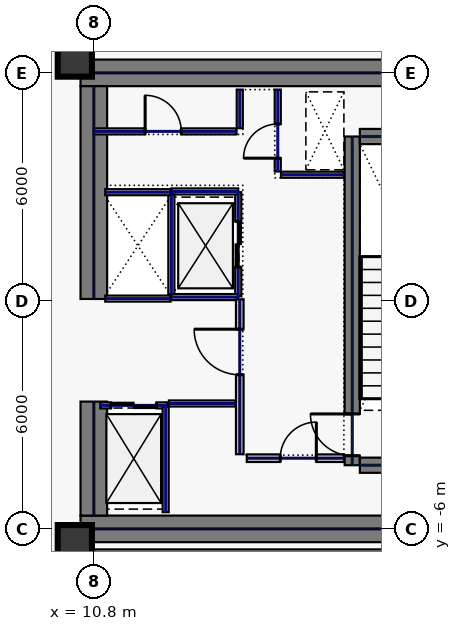
"""IFC4 building model, lengths in metres.
Left out: names, types, materials, properties, quantities, classifications, styles, units other than length and angle.
Written with IfcOpenShell. Run it as: python <this file> out.ifc"""

import sys

from ifc_helpers import new_model, si_unit, direction, frame, frame_2d, origin, origin_2d, place, context, subcontext, project, spatial, rectangle, hollow_rectangle, extrude, element, fill, save


model = new_model("IFC4")
c1 = context("Model", 3, precision=1e-05, world=origin(), true_north=direction((0.0, 1.0)))
c2 = subcontext(c1, "Body", "Model", "MODEL_VIEW")
j1 = project(units=[si_unit("LENGTHUNIT", "METRE"), si_unit("PLANEANGLEUNIT", "RADIAN")], contexts=[c1])
p1 = place(None, origin())
s1 = spatial("IfcSite", under=j1, at=p1, CompositionType="ELEMENT")
p2 = place(p1, origin())
s2 = spatial("IfcBuilding", under=s1, at=p2, CompositionType="ELEMENT")
p3 = place(p2, frame((0.0, 0.0, 196.2)))
s3 = spatial("IfcBuildingStorey", under=s2, at=p3, CompositionType="ELEMENT", Elevation=196.2)
for number, where, z_axis, x_axis in (
    (1, (10.45, 6.0, 0.0), (0.0, 0.0, 1.0), (1.0, 0.0, 0.0)),
    (2, (10.45, -6.0, 0.0), (0.0, 0.0, 1.0), (1.0, 0.0, 0.0)),
):
    element("IfcWall", number, at=place(p3, frame(where, z_axis=z_axis, x_axis=x_axis)), inside=s3, PredefinedType="SHEAR", context=c2, shape_type="SweptSolid", body=[
        extrude(rectangle(XDim=11.55, YDim=0.7, at=frame_2d((5.775, 0.0))), origin(), (0.0, 0.0, 1.0), 3.74),
    ])
p4 = place(p3, frame((10.8, -5.65, 0.0), z_axis=(0.0, 0.0, 1.0), x_axis=(0.0, 1.0, 0.0)))
e3 = element("IfcWall", 3, at=p4, inside=s3, PredefinedType="SHEAR", context=c2, shape_type="SweptSolid", body=[
    extrude(rectangle(XDim=3.0, YDim=0.7, at=frame_2d((1.5, 0.0))), origin(), (0.0, 0.0, 1.0), 3.74),
])
p5 = place(p3, frame((10.8, 0.05, 0.0), z_axis=(0.0, 0.0, 1.0), x_axis=(0.0, 1.0, 0.0)))
e4 = element("IfcWall", 4, at=p5, inside=s3, PredefinedType="SHEAR", context=c2, shape_type="SweptSolid", body=[
    extrude(rectangle(XDim=5.6, YDim=0.7, at=frame_2d((2.8, 0.0))), origin(), (0.0, 0.0, 1.0), 3.74),
])
p6 = place(p3, frame((17.6, -4.325, 0.0), z_axis=(0.0, 0.0, 1.0), x_axis=(0.0, 1.0, 0.0)))
e5 = element("IfcWall", 5, at=p6, inside=s3, PredefinedType="SHEAR", context=c2, shape_type="SweptSolid", body=[
    extrude(rectangle(XDim=8.65, YDim=0.4, at=frame_2d((4.325, 0.0))), origin(), (0.0, 0.0, 1.0), 3.74),
])
p7 = place(p6, frame((0.25, 0.0, 0.0)))
e6 = element("IfcOpeningElement", 6, at=p7, cuts=e5, PredefinedType="OPENING", context=c2, shape_type="SweptSolid", body=[
    extrude(rectangle(XDim=1.1, YDim=2.2, at=frame_2d((0.55, 1.1))), frame((0.0, 0.21, 0.0), z_axis=(0.0, -1.0, 0.0), x_axis=(1.0, 0.0, 0.0)), (0.0, 0.0, 1.0), 0.42),
])
for number, where, z_axis, x_axis in (
    (7, (17.8, -4.325, 0.0), (0.0, 0.0, 1.0), (1.0, 0.0, 0.0)),
    (8, (17.8, 4.325, 0.0), (0.0, 0.0, 1.0), (1.0, 0.0, 0.0)),
):
    element("IfcWall", number, at=place(p3, frame(where, z_axis=z_axis, x_axis=x_axis)), inside=s3, PredefinedType="SHEAR", context=c2, shape_type="SweptSolid", body=[
        extrude(rectangle(XDim=3.4, YDim=0.4, at=frame_2d((1.7, 0.0))), origin(), (0.0, 0.0, 1.0), 3.74),
    ])
for number, where, z_axis, x_axis in (
    (9, (10.3, -6.35, 0.0), (0.0, 0.0, 1.0), (1.0, 0.0, 0.0)),
    (10, (10.3, 6.35, 0.0), (0.0, 0.0, 1.0), (1.0, 0.0, 0.0)),
):
    element("IfcColumn", number, at=place(p3, frame(where, z_axis=z_axis, x_axis=x_axis)), inside=s3, PredefinedType="COLUMN", context=c2, shape_type="SweptSolid", body=[
        extrude(hollow_rectangle(XDim=0.9, YDim=0.9, WallThickness=0.04, at=origin_2d()), origin(), (0.0, 0.0, 1.0), 3.74),
    ])
p8 = place(p3, frame((14.6, 0.12, 0.0), z_axis=(0.0, 0.0, 1.0), x_axis=(0.0, 1.0, 0.0)))
e11 = element("IfcWall", 11, at=p8, inside=s3, PredefinedType="PARTITIONING", context=c2, shape_type="SweptSolid", body=[
    extrude(rectangle(XDim=2.74, YDim=0.16, at=frame_2d((1.37, 0.0))), origin(), (0.0, 0.0, 1.0), 3.74),
])
p9 = place(p8, frame((0.77, 0.0, 0.0)))
e12 = element("IfcOpeningElement", 12, at=p9, cuts=e11, PredefinedType="OPENING", context=c2, shape_type="SweptSolid", body=[
    extrude(rectangle(XDim=1.2, YDim=2.2, at=frame_2d((0.6, 1.1))), frame((0.0, 0.09, 0.0), z_axis=(0.0, -1.0, 0.0), x_axis=(1.0, 0.0, 0.0)), (0.0, 0.0, 1.0), 0.18),
])
for number, where, z_axis, x_axis in (
    (13, (12.84, 0.1, 0.0), (0.0, 0.0, 1.0), (1.0, 0.0, 0.0)),
    (14, (12.84, 2.88, 0.0), (0.0, 0.0, 1.0), (1.0, 0.0, 0.0)),
):
    element("IfcWall", number, at=place(p3, frame(where, z_axis=z_axis, x_axis=x_axis)), inside=s3, PredefinedType="PARTITIONING", context=c2, shape_type="SweptSolid", body=[
        extrude(rectangle(XDim=1.76, YDim=0.16, at=frame_2d((0.88, 0.0))), origin(), (0.0, 0.0, 1.0), 3.74),
    ])
p10 = place(p3, frame((12.84, 0.18, 0.0), z_axis=(0.0, 0.0, 1.0), x_axis=(0.0, 1.0, 0.0)))
e15 = element("IfcWall", 15, at=p10, inside=s3, PredefinedType="PARTITIONING", context=c2, shape_type="SweptSolid", body=[
    extrude(rectangle(XDim=2.62, YDim=0.16, at=frame_2d((1.31, 0.0))), origin(), (0.0, 0.0, 1.0), 3.74),
])
p11 = place(p3, frame((10.97, -2.75, 0.0), z_axis=(0.0, 0.0, 1.0), x_axis=(1.0, 0.0, 0.0)))
e16 = element("IfcWall", 16, at=p11, inside=s3, PredefinedType="PARTITIONING", context=c2, shape_type="SweptSolid", body=[
    extrude(rectangle(XDim=1.76, YDim=0.16, at=frame_2d((0.88, 0.0))), origin(), (0.0, 0.0, 1.0), 3.74),
])
p12 = place(p11, frame((0.28, 0.0, 0.0)))
e17 = element("IfcOpeningElement", 17, at=p12, cuts=e16, PredefinedType="OPENING", context=c2, shape_type="SweptSolid", body=[
    extrude(rectangle(XDim=1.2, YDim=2.2, at=frame_2d((0.6, 1.1))), frame((0.0, 0.09, 0.0), z_axis=(0.0, -1.0, 0.0), x_axis=(1.0, 0.0, 0.0)), (0.0, 0.0, 1.0), 0.18),
])
for number, where, z_axis, x_axis in (
    (18, (11.1, 0.06, 0.0), (0.0, 0.0, 1.0), (1.0, 0.0, 0.0)),
    (19, (11.1, 2.86, 0.0), (0.0, 0.0, 1.0), (1.0, 0.0, 0.0)),
):
    element("IfcWall", number, at=place(p3, frame(where, z_axis=z_axis, x_axis=x_axis)), inside=s3, PredefinedType="PARTITIONING", context=c2, shape_type="SweptSolid", body=[
        extrude(rectangle(XDim=1.72, YDim=0.16, at=frame_2d((0.86, 0.0))), origin(), (0.0, 0.0, 1.0), 3.74),
    ])
p13 = place(p3, frame((15.64, 3.405, 0.0), z_axis=(0.0, 0.0, 1.0), x_axis=(0.0, 1.0, 0.0)))
e20 = element("IfcWall", 20, at=p13, inside=s3, PredefinedType="PARTITIONING", context=c2, shape_type="SweptSolid", body=[
    extrude(rectangle(XDim=2.155, YDim=0.16, at=frame_2d((1.078, 0.0))), origin(), (0.0, 0.0, 1.0), 3.74),
])
p14 = place(p13, frame((0.35, 0.0, 0.0)))
e21 = element("IfcOpeningElement", 21, at=p14, cuts=e20, PredefinedType="OPENING", context=c2, shape_type="SweptSolid", body=[
    extrude(rectangle(XDim=0.9, YDim=2.2, at=frame_2d((0.45, 1.1))), frame((0.0, 0.09, 0.0), z_axis=(0.0, -1.0, 0.0), x_axis=(1.0, 0.0, 0.0)), (0.0, 0.0, 1.0), 0.18),
])
p15 = place(p3, frame((15.725, 3.32, 0.0), z_axis=(0.0, 0.0, 1.0), x_axis=(1.0, 0.0, 0.0)))
e22 = element("IfcWall", 22, at=p15, inside=s3, PredefinedType="PARTITIONING", context=c2, shape_type="SweptSolid", body=[
    extrude(rectangle(XDim=1.655, YDim=0.16, at=frame_2d((0.827, 0.0))), origin(), (0.0, 0.0, 1.0), 3.74),
])
p16 = place(p3, frame((14.825, -4.14, 0.0), z_axis=(0.0, 0.0, 1.0), x_axis=(1.0, 0.0, 0.0)))
e23 = element("IfcWall", 23, at=p16, inside=s3, PredefinedType="SOLIDWALL", context=c2, shape_type="SweptSolid", body=[
    extrude(rectangle(XDim=2.555, YDim=0.2, at=frame_2d((1.277, 0.0))), origin(), (0.0, 0.0, 1.0), 3.74),
])
p17 = place(p16, frame((0.88, 0.0, 0.0)))
e24 = element("IfcOpeningElement", 24, at=p17, cuts=e23, PredefinedType="OPENING", context=c2, shape_type="SweptSolid", body=[
    extrude(rectangle(XDim=0.95, YDim=2.2, at=frame_2d((0.475, 1.1))), frame((0.0, 0.11, 0.0), z_axis=(0.0, -1.0, 0.0), x_axis=(1.0, 0.0, 0.0)), (0.0, 0.0, 1.0), 0.22),
])
p18 = place(p3, frame((12.775, -2.7, 0.0), z_axis=(0.0, 0.0, 1.0), x_axis=(1.0, 0.0, 0.0)))
e25 = element("IfcWall", 25, at=p18, inside=s3, PredefinedType="PARTITIONING", context=c2, shape_type="SweptSolid", body=[
    extrude(rectangle(XDim=1.76, YDim=0.16, at=frame_2d((0.88, 0.0))), origin(), (0.0, 0.0, 1.0), 3.74),
])
p19 = place(p3, frame((12.69, -5.56, 0.0), z_axis=(0.0, 0.0, 1.0), x_axis=(0.0, 1.0, 0.0)))
e26 = element("IfcWall", 26, at=p19, inside=s3, PredefinedType="PARTITIONING", context=c2, shape_type="SweptSolid", body=[
    extrude(rectangle(XDim=2.775, YDim=0.16, at=frame_2d((1.388, 0.0))), origin(), (0.0, 0.0, 1.0), 3.74),
])
p20 = place(p3, frame((10.8, 4.46, 0.0), z_axis=(0.0, 0.0, 1.0), x_axis=(1.0, 0.0, 0.0)))
e27 = element("IfcWall", 27, at=p20, inside=s3, PredefinedType="PARTITIONING", context=c2, shape_type="SweptSolid", body=[
    extrude(rectangle(XDim=3.755, YDim=0.16, at=frame_2d((1.877, 0.0))), origin(), (0.0, 0.0, 1.0), 3.74),
])
p21 = place(p20, frame((1.35, 0.0, 0.0)))
e28 = element("IfcOpeningElement", 28, at=p21, cuts=e27, PredefinedType="OPENING", context=c2, shape_type="SweptSolid", body=[
    extrude(rectangle(XDim=0.95, YDim=2.2, at=frame_2d((0.475, 1.1))), frame((0.0, 0.09, 0.0), z_axis=(0.0, -1.0, 0.0), x_axis=(1.0, 0.0, 0.0)), (0.0, 0.0, 1.0), 0.18),
])
p22 = place(p3, frame((14.64, 4.545, 0.0), z_axis=(0.0, 0.0, 1.0), x_axis=(0.0, 1.0, 0.0)))
e29 = element("IfcWall", 29, at=p22, inside=s3, PredefinedType="PARTITIONING", context=c2, shape_type="SweptSolid", body=[
    extrude(rectangle(XDim=1.015, YDim=0.16, at=frame_2d((0.508, 0.0))), origin(), (0.0, 0.0, 1.0), 3.74),
])
p23 = place(p3, frame((14.64, -4.035, 0.0), z_axis=(0.0, 0.0, 1.0), x_axis=(0.0, 1.0, 0.0)))
e30 = element("IfcWall", 30, at=p23, inside=s3, PredefinedType="SOLIDWALL", context=c2, shape_type="SweptSolid", body=[
    extrude(rectangle(XDim=4.075, YDim=0.2, at=frame_2d((2.038, 0.0))), origin(), (0.0, 0.0, 1.0), 3.74),
])
p24 = place(p23, frame((2.09, 0.0, 0.0)))
e31 = element("IfcOpeningElement", 31, at=p24, cuts=e30, PredefinedType="OPENING", context=c2, shape_type="SweptSolid", body=[
    extrude(rectangle(XDim=1.2, YDim=2.2, at=frame_2d((0.6, 1.1))), frame((0.0, 0.11, 0.0), z_axis=(0.0, -1.0, 0.0), x_axis=(1.0, 0.0, 0.0)), (0.0, 0.0, 1.0), 0.22),
])
p25 = place(p3, frame((10.63, -6.62, 0.0), z_axis=(0.0, 0.0, 1.0), x_axis=(1.0, 0.0, 0.0)))
e32 = element("IfcWall", 32, at=p25, inside=s3, PredefinedType="PARTITIONING", context=c2, shape_type="SweptSolid", body=[
    extrude(rectangle(XDim=14.335, YDim=0.16, at=frame_2d((7.167, 0.0))), origin(), (0.0, 0.0, 1.0), 3.74),
])
p26 = place(p7, origin())
e33 = element("IfcDoor", 33, at=p26, inside=s3, OperationType="SINGLE_SWING_RIGHT", PredefinedType="DOOR", context=c2, shape_type="SweptSolid", body=[
    extrude(rectangle(XDim=1.1, YDim=2.2, at=frame_2d((0.55, 1.1))), frame((0.0, 0.025, 0.0), z_axis=(0.0, -1.0, 0.0), x_axis=(1.0, 0.0, 0.0)), (0.0, 0.0, 1.0), 0.05),
])
fill(e6, e33)
p27 = place(p9, origin())
e34 = element("IfcDoor", 34, at=p27, inside=s3, OperationType="SLIDING_TO_LEFT", PredefinedType="DOOR", context=c2, shape_type="SweptSolid", body=[
    extrude(rectangle(XDim=1.2, YDim=2.2, at=frame_2d((0.6, 1.1))), frame((0.0, 0.025, 0.0), z_axis=(0.0, -1.0, 0.0), x_axis=(1.0, 0.0, 0.0)), (0.0, 0.0, 1.0), 0.05),
])
fill(e12, e34)
p28 = place(p12, origin())
e35 = element("IfcDoor", 35, at=p28, inside=s3, OperationType="SLIDING_TO_LEFT", PredefinedType="DOOR", context=c2, shape_type="SweptSolid", body=[
    extrude(rectangle(XDim=1.2, YDim=2.2, at=frame_2d((0.6, 1.1))), frame((0.0, 0.025, 0.0), z_axis=(0.0, -1.0, 0.0), x_axis=(1.0, 0.0, 0.0)), (0.0, 0.0, 1.0), 0.05),
])
fill(e17, e35)
p29 = place(p14, origin())
e36 = element("IfcDoor", 36, at=p29, inside=s3, OperationType="SINGLE_SWING_LEFT", PredefinedType="DOOR", context=c2, shape_type="SweptSolid", body=[
    extrude(rectangle(XDim=0.9, YDim=2.2, at=frame_2d((0.45, 1.1))), frame((0.0, 0.025, 0.0), z_axis=(0.0, -1.0, 0.0), x_axis=(1.0, 0.0, 0.0)), (0.0, 0.0, 1.0), 0.05),
])
fill(e21, e36)
p30 = place(p17, origin())
e37 = element("IfcDoor", 37, at=p30, inside=s3, OperationType="SINGLE_SWING_RIGHT", PredefinedType="DOOR", context=c2, shape_type="SweptSolid", body=[
    extrude(rectangle(XDim=0.95, YDim=2.2, at=frame_2d((0.475, 1.1))), frame((0.0, 0.025, 0.0), z_axis=(0.0, -1.0, 0.0), x_axis=(1.0, 0.0, 0.0)), (0.0, 0.0, 1.0), 0.05),
])
fill(e24, e37)
p31 = place(p21, origin())
e38 = element("IfcDoor", 38, at=p31, inside=s3, OperationType="SINGLE_SWING_LEFT", PredefinedType="DOOR", context=c2, shape_type="SweptSolid", body=[
    extrude(rectangle(XDim=0.95, YDim=2.2, at=frame_2d((0.475, 1.1))), frame((0.0, 0.025, 0.0), z_axis=(0.0, -1.0, 0.0), x_axis=(1.0, 0.0, 0.0)), (0.0, 0.0, 1.0), 0.05),
])
fill(e28, e38)
p32 = place(p24, origin())
e39 = element("IfcDoor", 39, at=p32, inside=s3, OperationType="SINGLE_SWING_RIGHT", PredefinedType="DOOR", context=c2, shape_type="SweptSolid", body=[
    extrude(rectangle(XDim=1.2, YDim=2.2, at=frame_2d((0.6, 1.1))), frame((0.0, 0.025, 0.0), z_axis=(0.0, -1.0, 0.0), x_axis=(1.0, 0.0, 0.0)), (0.0, 0.0, 1.0), 0.05),
])
fill(e31, e39)
save(model, sys.argv[1])
